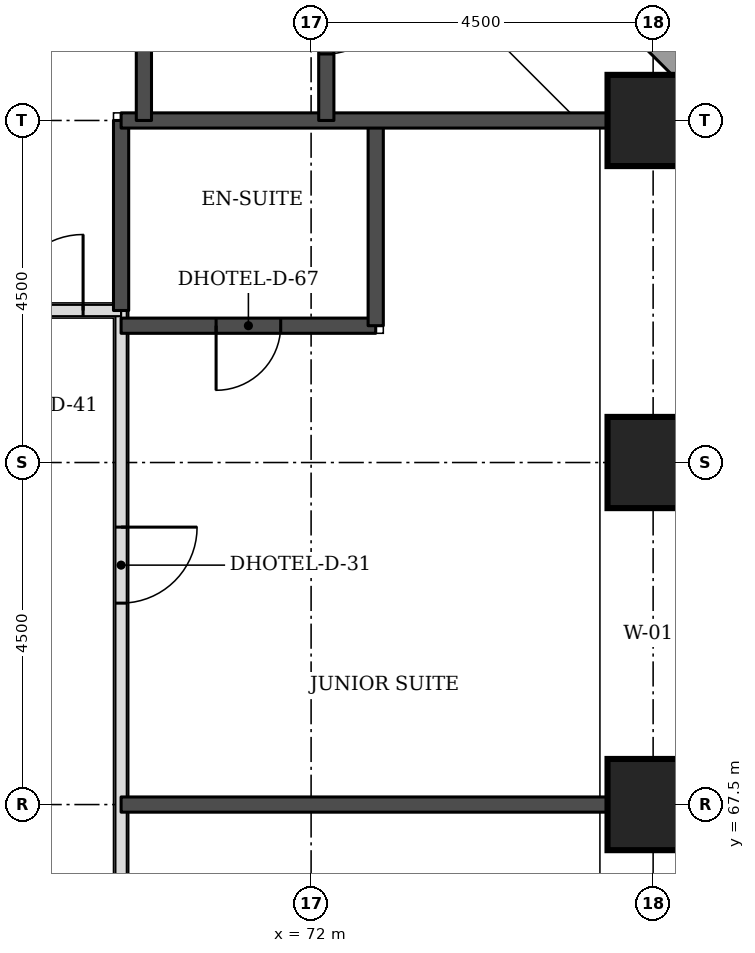
"""IFC4 building model, lengths in metres.
Left out: names, types, materials, properties, quantities, classifications, styles, units other than length and angle.
Written with IfcOpenShell. Run it as: python <this file> out.ifc"""

import sys

from ifc_helpers import new_model, si_unit, direction, frame, frame_2d, origin, origin_2d, place, context, subcontext, project, spatial, rectangle, extrude, element, fill, save


model = new_model("IFC4")
c1 = context("Model", 3, precision=1e-05, world=origin(), true_north=direction((0.0, 1.0)))
c2 = subcontext(c1, "Body", "Model", "MODEL_VIEW")
j1 = project(units=[si_unit("LENGTHUNIT", "METRE"), si_unit("PLANEANGLEUNIT", "RADIAN")], contexts=[c1])
p1 = place(None, origin())
s1 = spatial("IfcSite", under=j1, at=p1, CompositionType="ELEMENT")
p2 = place(p1, origin())
s2 = spatial("IfcBuilding", under=s1, at=p2, CompositionType="ELEMENT")
p3 = place(p2, frame((0.0, 0.0, 59.4)))
s3 = spatial("IfcBuildingStorey", under=s2, at=p3, CompositionType="ELEMENT", Elevation=59.4)
for number, where, z_axis, x_axis in (
    (1, (76.5, 67.5, 0.0), (0.0, 0.0, 1.0), (1.0, 0.0, 0.0)),
    (2, (76.5, 72.0, 0.0), (0.0, 0.0, 1.0), (1.0, 0.0, 0.0)),
    (3, (76.5, 76.5, 0.0), (0.0, 0.0, 1.0), (1.0, 0.0, 0.0)),
):
    element("IfcColumn", number, at=place(p3, frame(where, z_axis=z_axis, x_axis=x_axis)), inside=s3, PredefinedType="COLUMN", context=c2, shape_type="SweptSolid", body=[
        extrude(rectangle(XDim=1.2, YDim=1.2, at=origin_2d()), origin(), (0.0, 0.0, 1.0), 3.3),
    ])
p4 = place(p3, frame((77.326, 76.77, 0.0), z_axis=(0.0, 0.0, 1.0), x_axis=(-0.707106781187, 0.707106781187, 0.0)))
e4 = element("IfcWall", 4, at=p4, inside=s3, PredefinedType="STANDARD", context=c2, shape_type="SweptSolid", body=[
    extrude(rectangle(XDim=7.151, YDim=0.35, at=frame_2d((3.576, 0.0))), origin(), (0.0, 0.0, 1.0), 3.055),
])
p5 = place(p4, frame((1.926, 0.0, 0.8)))
e5 = element("IfcOpeningElement", 5, at=p5, cuts=e4, PredefinedType="OPENING", context=c2, shape_type="SweptSolid", body=[
    extrude(rectangle(XDim=3.3, YDim=1.5, at=frame_2d((1.65, 0.75))), frame((0.0, 0.185, 0.0), z_axis=(0.0, -1.0, 0.0), x_axis=(1.0, 0.0, 0.0)), (0.0, 0.0, 1.0), 0.37),
])
p6 = place(p3, frame((69.5, 47.5, 0.0), z_axis=(0.0, 0.0, 1.0), x_axis=(0.0, 1.0, 0.0)))
e6 = element("IfcWall", 6, at=p6, inside=s3, PredefinedType="PARTITIONING", context=c2, shape_type="SweptSolid", body=[
    extrude(rectangle(XDim=26.5, YDim=0.15, at=frame_2d((13.25, 0.0))), origin(), (0.0, 0.0, 1.0), 3.08),
])
p7 = place(p6, frame((22.65, 0.0, 0.0)))
e7 = element("IfcOpeningElement", 7, at=p7, cuts=e6, PredefinedType="OPENING", context=c2, shape_type="SweptSolid", body=[
    extrude(rectangle(XDim=1.0, YDim=2.1, at=frame_2d((0.5, 1.05))), frame((0.0, 0.085, 0.0), z_axis=(0.0, -1.0, 0.0), x_axis=(1.0, 0.0, 0.0)), (0.0, 0.0, 1.0), 0.17),
])
p8 = place(p6, frame((16.6, 0.0, 0.0)))
e8 = element("IfcOpeningElement", 8, at=p8, cuts=e6, PredefinedType="OPENING", context=c2, shape_type="SweptSolid", body=[
    extrude(rectangle(XDim=1.0, YDim=2.1, at=frame_2d((0.5, 1.05))), frame((0.0, 0.085, 0.0), z_axis=(0.0, -1.0, 0.0), x_axis=(1.0, 0.0, 0.0)), (0.0, 0.0, 1.0), 0.17),
])
p9 = place(p6, frame((4.25, 0.0, 0.0)))
e9 = element("IfcOpeningElement", 9, at=p9, cuts=e6, PredefinedType="OPENING", context=c2, shape_type="SweptSolid", body=[
    extrude(rectangle(XDim=1.1, YDim=2.1, at=frame_2d((0.55, 1.05))), frame((0.0, 0.085, 0.0), z_axis=(0.0, -1.0, 0.0), x_axis=(1.0, 0.0, 0.0)), (0.0, 0.0, 1.0), 0.17),
])
p10 = place(p6, frame((0.55, 0.0, 0.0)))
e10 = element("IfcOpeningElement", 10, at=p10, cuts=e6, PredefinedType="OPENING", context=c2, shape_type="SweptSolid", body=[
    extrude(rectangle(XDim=1.0, YDim=2.1, at=frame_2d((0.5, 1.05))), frame((0.0, 0.085, 0.0), z_axis=(0.0, -1.0, 0.0), x_axis=(1.0, 0.0, 0.0)), (0.0, 0.0, 1.0), 0.17),
])
p11 = place(p3, frame((43.0, 74.0, 0.0), z_axis=(0.0, 0.0, 1.0), x_axis=(1.0, 0.0, 0.0)))
e11 = element("IfcWall", 11, at=p11, inside=s3, PredefinedType="PARTITIONING", context=c2, shape_type="SweptSolid", body=[
    extrude(rectangle(XDim=26.5, YDim=0.15, at=frame_2d((13.25, 0.0))), origin(), (0.0, 0.0, 1.0), 3.08),
])
p12 = place(p11, frame((7.6, 0.0, 0.0)))
e12 = element("IfcOpeningElement", 12, at=p12, cuts=e11, PredefinedType="OPENING", context=c2, shape_type="SweptSolid", body=[
    extrude(rectangle(XDim=1.0, YDim=2.1, at=frame_2d((0.5, 1.05))), frame((0.0, 0.085, 0.0), z_axis=(0.0, -1.0, 0.0), x_axis=(1.0, 0.0, 0.0)), (0.0, 0.0, 1.0), 0.17),
])
p13 = place(p11, frame((13.65, 0.0, 0.0)))
e13 = element("IfcOpeningElement", 13, at=p13, cuts=e11, PredefinedType="OPENING", context=c2, shape_type="SweptSolid", body=[
    extrude(rectangle(XDim=1.0, YDim=2.1, at=frame_2d((0.5, 1.05))), frame((0.0, 0.085, 0.0), z_axis=(0.0, -1.0, 0.0), x_axis=(1.0, 0.0, 0.0)), (0.0, 0.0, 1.0), 0.17),
])
p14 = place(p11, frame((23.05, 0.0, 0.0)))
e14 = element("IfcOpeningElement", 14, at=p14, cuts=e11, PredefinedType="OPENING", context=c2, shape_type="SweptSolid", body=[
    extrude(rectangle(XDim=1.0, YDim=2.1, at=frame_2d((0.5, 1.05))), frame((0.0, 0.085, 0.0), z_axis=(0.0, -1.0, 0.0), x_axis=(1.0, 0.0, 0.0)), (0.0, 0.0, 1.0), 0.17),
])
p15 = place(p11, frame((0.5, 0.0, 0.0)))
e15 = element("IfcOpeningElement", 15, at=p15, cuts=e11, PredefinedType="OPENING", context=c2, shape_type="SweptSolid", body=[
    extrude(rectangle(XDim=1.0, YDim=2.1, at=frame_2d((0.5, 1.05))), frame((0.0, 0.085, 0.0), z_axis=(0.0, -1.0, 0.0), x_axis=(1.0, 0.0, 0.0)), (0.0, 0.0, 1.0), 0.17),
])
p16 = place(p11, frame((25.0, 0.0, 0.0)))
e16 = element("IfcOpeningElement", 16, at=p16, cuts=e11, PredefinedType="OPENING", context=c2, shape_type="SweptSolid", body=[
    extrude(rectangle(XDim=1.0, YDim=2.1, at=frame_2d((0.5, 1.05))), frame((0.0, 0.085, 0.0), z_axis=(0.0, -1.0, 0.0), x_axis=(1.0, 0.0, 0.0)), (0.0, 0.0, 1.0), 0.17),
])
p17 = place(p3, frame((69.5, 67.5, 0.0), z_axis=(0.0, 0.0, 1.0), x_axis=(1.0, 0.0, 0.0)))
e17 = element("IfcWall", 17, at=p17, inside=s3, PredefinedType="SOLIDWALL", context=c2, shape_type="SweptSolid", body=[
    extrude(rectangle(XDim=6.4, YDim=0.2, at=frame_2d((3.2, 0.0))), origin(), (0.0, 0.0, 1.0), 3.08),
])
p18 = place(p3, frame((69.5, 73.8, 0.0), z_axis=(0.0, 0.0, 1.0), x_axis=(1.0, 0.0, 0.0)))
e18 = element("IfcWall", 18, at=p18, inside=s3, PredefinedType="SOLIDWALL", context=c2, shape_type="SweptSolid", body=[
    extrude(rectangle(XDim=3.35, YDim=0.2, at=frame_2d((1.675, 0.0))), origin(), (0.0, 0.0, 1.0), 3.08),
])
p19 = place(p18, frame((1.25, 0.0, 0.0)))
e19 = element("IfcOpeningElement", 19, at=p19, cuts=e18, PredefinedType="OPENING", context=c2, shape_type="SweptSolid", body=[
    extrude(rectangle(XDim=0.85, YDim=2.1, at=frame_2d((0.425, 1.05))), frame((0.0, 0.11, 0.0), z_axis=(0.0, -1.0, 0.0), x_axis=(1.0, 0.0, 0.0)), (0.0, 0.0, 1.0), 0.22),
])
p20 = place(p3, frame((72.85, 73.8, 0.0), z_axis=(0.0, 0.0, 1.0), x_axis=(0.0, 1.0, 0.0)))
e20 = element("IfcWall", 20, at=p20, inside=s3, PredefinedType="SOLIDWALL", context=c2, shape_type="SweptSolid", body=[
    extrude(rectangle(XDim=2.7, YDim=0.2, at=frame_2d((1.35, 0.0))), origin(), (0.0, 0.0, 1.0), 3.08),
])
p21 = place(p3, frame((69.5, 74.0, 0.0), z_axis=(0.0, 0.0, 1.0), x_axis=(0.0, 1.0, 0.0)))
e21 = element("IfcWall", 21, at=p21, inside=s3, PredefinedType="SOLIDWALL", context=c2, shape_type="SweptSolid", body=[
    extrude(rectangle(XDim=2.5, YDim=0.2, at=frame_2d((1.25, 0.0))), origin(), (0.0, 0.0, 1.0), 3.08),
])
p22 = place(p3, frame((69.5, 76.5, 0.0), z_axis=(0.0, 0.0, 1.0), x_axis=(1.0, 0.0, 0.0)))
e22 = element("IfcWall", 22, at=p22, inside=s3, PredefinedType="SOLIDWALL", context=c2, shape_type="SweptSolid", body=[
    extrude(rectangle(XDim=6.4, YDim=0.2, at=frame_2d((3.2, 0.0))), origin(), (0.0, 0.0, 1.0), 3.08),
])
p23 = place(p3, frame((69.8, 76.5, 0.0), z_axis=(0.0, 0.0, 1.0), x_axis=(0.0, 1.0, 0.0)))
e23 = element("IfcWall", 23, at=p23, inside=s3, PredefinedType="SOLIDWALL", context=c2, shape_type="SweptSolid", body=[
    extrude(rectangle(XDim=2.5, YDim=0.2, at=frame_2d((1.25, 0.0))), origin(), (0.0, 0.0, 1.0), 3.08),
])
p24 = place(p3, frame((72.2, 76.5, 0.0), z_axis=(0.0, 0.0, 1.0), x_axis=(0.0, 1.0, 0.0)))
e24 = element("IfcWall", 24, at=p24, inside=s3, PredefinedType="SOLIDWALL", context=c2, shape_type="SweptSolid", body=[
    extrude(rectangle(XDim=2.5, YDim=0.2, at=frame_2d((1.25, 0.0))), origin(), (0.0, 0.0, 1.0), 3.08),
])
p25 = place(p24, frame((0.875, 0.0, 0.0)))
e25 = element("IfcOpeningElement", 25, at=p25, cuts=e24, PredefinedType="OPENING", context=c2, shape_type="SweptSolid", body=[
    extrude(rectangle(XDim=0.85, YDim=2.1, at=frame_2d((0.425, 1.05))), frame((0.0, 0.11, 0.0), z_axis=(0.0, -1.0, 0.0), x_axis=(1.0, 0.0, 0.0)), (0.0, 0.0, 1.0), 0.22),
])
p26 = place(p7, frame((1.0, 0.0, 0.0), z_axis=(0.0, 0.0, 1.0), x_axis=(-1.0, 0.0, 0.0)))
e26 = element("IfcDoor", 26, at=p26, inside=s3, OperationType="SINGLE_SWING_LEFT", PredefinedType="DOOR", context=c2, shape_type="SweptSolid", body=[
    extrude(rectangle(XDim=1.0, YDim=2.1, at=frame_2d((0.5, 1.05))), frame((0.0, 0.025, 0.0), z_axis=(0.0, -1.0, 0.0), x_axis=(1.0, 0.0, 0.0)), (0.0, 0.0, 1.0), 0.05),
])
fill(e7, e26)
p27 = place(p19, frame((0.85, 0.0, 0.0), z_axis=(0.0, 0.0, 1.0), x_axis=(-1.0, 0.0, 0.0)))
e27 = element("IfcDoor", 27, at=p27, inside=s3, OperationType="SINGLE_SWING_RIGHT", PredefinedType="DOOR", context=c2, shape_type="SweptSolid", body=[
    extrude(rectangle(XDim=0.85, YDim=2.1, at=frame_2d((0.425, 1.05))), frame((0.0, 0.025, 0.0), z_axis=(0.0, -1.0, 0.0), x_axis=(1.0, 0.0, 0.0)), (0.0, 0.0, 1.0), 0.05),
])
fill(e19, e27)
p28 = place(p16, origin())
e28 = element("IfcDoor", 28, at=p28, inside=s3, OperationType="SINGLE_SWING_RIGHT", PredefinedType="DOOR", context=c2, shape_type="SweptSolid", body=[
    extrude(rectangle(XDim=1.0, YDim=2.1, at=frame_2d((0.5, 1.05))), frame((0.0, 0.025, 0.0), z_axis=(0.0, -1.0, 0.0), x_axis=(1.0, 0.0, 0.0)), (0.0, 0.0, 1.0), 0.05),
])
fill(e16, e28)
p29 = place(p25, frame((0.85, 0.0, 0.0), z_axis=(0.0, 0.0, 1.0), x_axis=(-1.0, 0.0, 0.0)))
e29 = element("IfcDoor", 29, at=p29, inside=s3, OperationType="SINGLE_SWING_LEFT", PredefinedType="DOOR", context=c2, shape_type="SweptSolid", body=[
    extrude(rectangle(XDim=0.85, YDim=2.1, at=frame_2d((0.425, 1.05))), frame((0.0, 0.025, 0.0), z_axis=(0.0, -1.0, 0.0), x_axis=(1.0, 0.0, 0.0)), (0.0, 0.0, 1.0), 0.05),
])
fill(e25, e29)
save(model, sys.argv[1])
